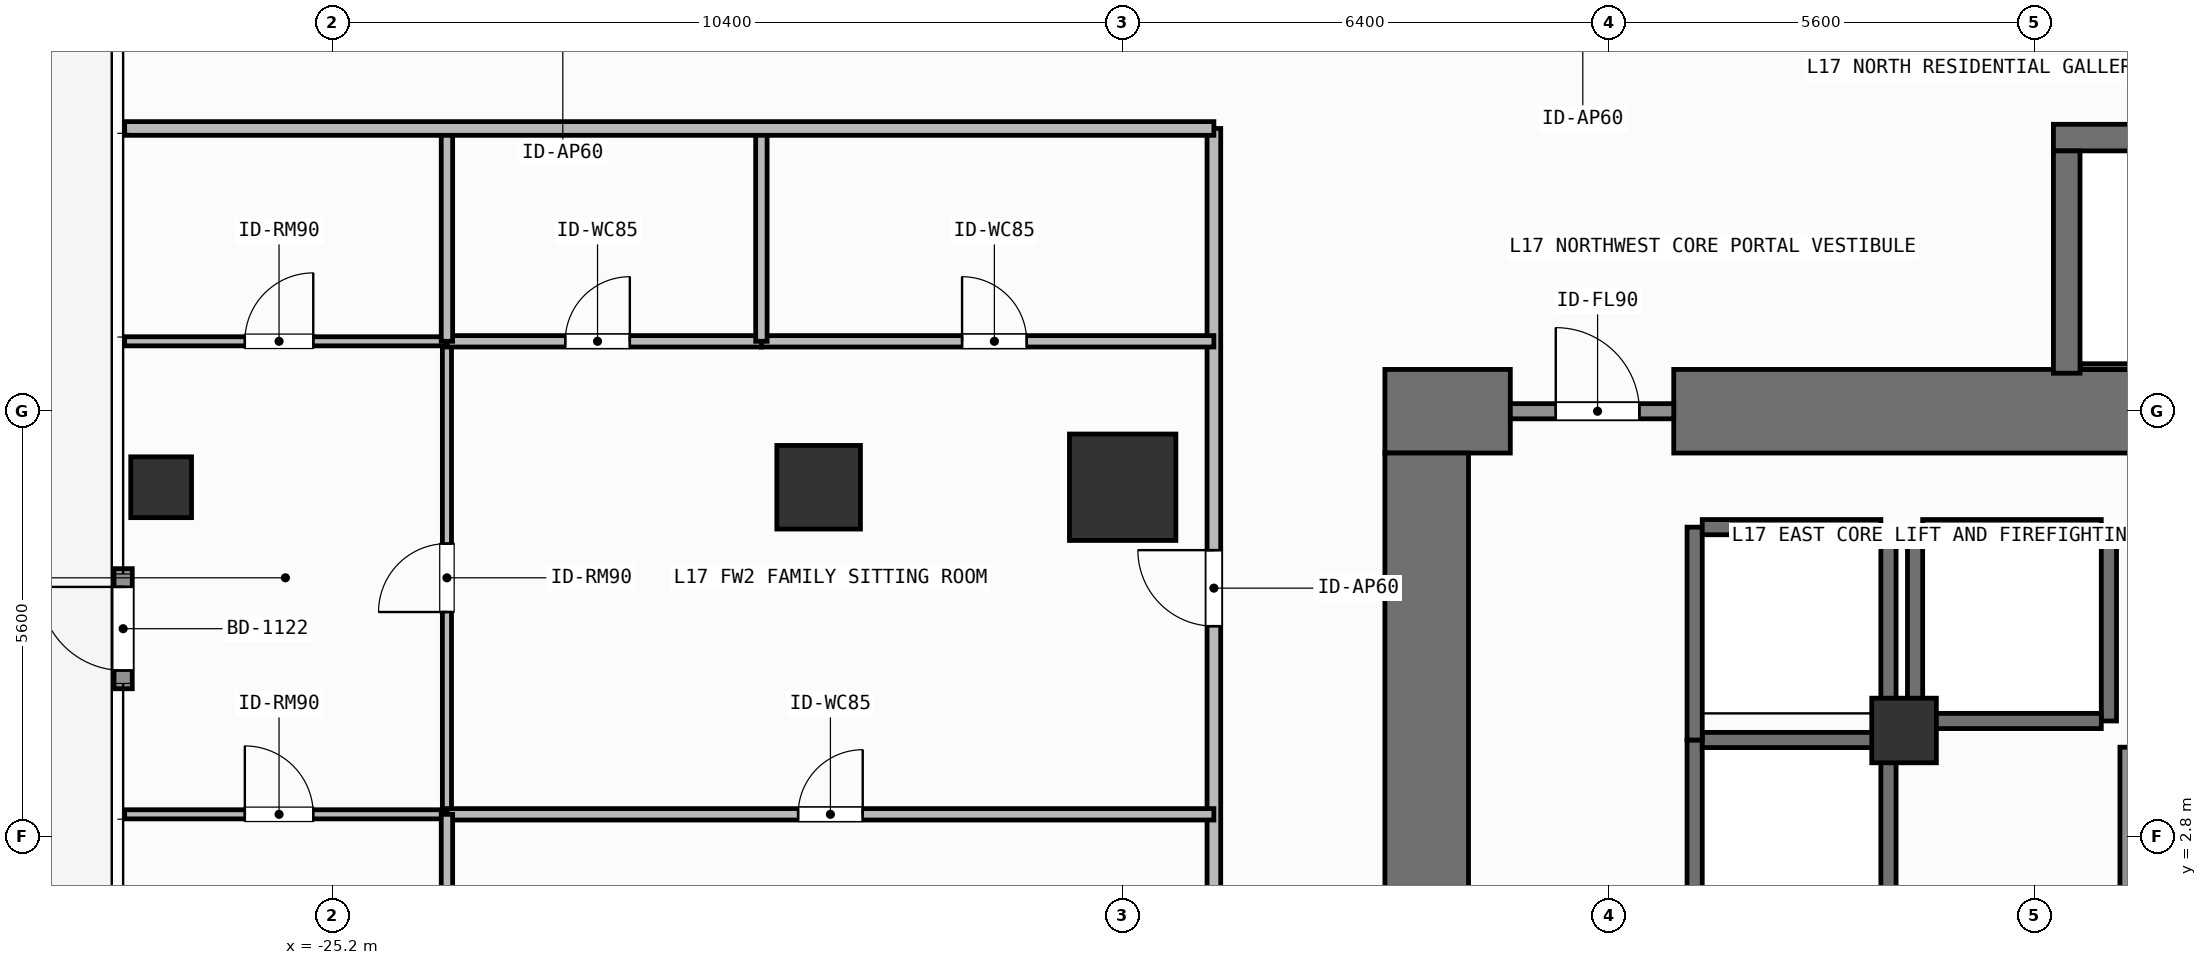
"""IFC4 building model, lengths in metres.
Left out: names, types, materials, properties, quantities, classifications, styles, units other than length and angle.
Written with IfcOpenShell. Run it as: python <this file> out.ifc"""

import sys

from ifc_helpers import new_model, si_unit, direction, frame, frame_2d, origin, origin_2d, place, context, subcontext, project, spatial, rectangle, hollow_rectangle, extrude, element, fill, save


model = new_model("IFC4")
c1 = context("Model", 3, precision=1e-05, world=origin(), true_north=direction((0.0, 1.0)))
c2 = subcontext(c1, "Body", "Model", "MODEL_VIEW")
j1 = project(units=[si_unit("LENGTHUNIT", "METRE"), si_unit("PLANEANGLEUNIT", "RADIAN")], contexts=[c1])
p1 = place(None, origin())
s1 = spatial("IfcSite", under=j1, at=p1, CompositionType="ELEMENT")
p2 = place(p1, origin())
s2 = spatial("IfcBuilding", under=s1, at=p2, CompositionType="ELEMENT")
p3 = place(p2, frame((0.0, 0.0, 65.7)))
s3 = spatial("IfcBuildingStorey", under=s2, at=p3, CompositionType="ELEMENT", Elevation=65.7)
p4 = place(p3, frame((-11.35, 8.4, 0.0), z_axis=(0.0, 0.0, 1.0), x_axis=(1.0, 0.0, 0.0)))
e1 = element("IfcWall", 1, at=p4, inside=s3, PredefinedType="SHEAR", context=c2, shape_type="SweptSolid", body=[
    extrude(rectangle(XDim=1.65, YDim=1.1, at=frame_2d((0.825, 0.0))), origin(), (0.0, 0.0, 1.0), 3.9),
])
p5 = place(p3, frame((-7.55, 8.4, 0.0), z_axis=(0.0, 0.0, 1.0), x_axis=(1.0, 0.0, 0.0)))
e2 = element("IfcWall", 2, at=p5, inside=s3, PredefinedType="SHEAR", context=c2, shape_type="SweptSolid", body=[
    extrude(rectangle(XDim=16.5, YDim=1.1, at=frame_2d((8.25, 0.0))), origin(), (0.0, 0.0, 1.0), 3.9),
])
p6 = place(p3, frame((-10.8, -7.85, 0.0), z_axis=(0.0, 0.0, 1.0), x_axis=(0.0, 1.0, 0.0)))
e3 = element("IfcWall", 3, at=p6, inside=s3, PredefinedType="SHEAR", context=c2, shape_type="SweptSolid", body=[
    extrude(rectangle(XDim=15.7, YDim=1.1, at=frame_2d((7.85, 0.0))), origin(), (0.0, 0.0, 1.0), 3.9),
])
p7 = place(p3, frame((-2.555, 12.0, 0.0), z_axis=(0.0, 0.0, 1.0), x_axis=(1.0, 0.0, 0.0)))
e4 = element("IfcWall", 4, at=p7, inside=s3, PredefinedType="SHEAR", context=c2, shape_type="SweptSolid", body=[
    extrude(rectangle(XDim=7.31, YDim=0.35, at=frame_2d((3.655, 0.0))), origin(), (0.0, 0.0, 1.0), 3.9),
])
p8 = place(p3, frame((-2.2, 8.988, 0.0), z_axis=(0.0, 0.0, 1.0), x_axis=(1.0, 0.0, 0.0)))
e5 = element("IfcWall", 5, at=p8, inside=s3, PredefinedType="SHEAR", context=c2, shape_type="SweptSolid", body=[
    extrude(rectangle(XDim=6.6, YDim=0.075, at=frame_2d((3.3, 0.0))), origin(), (0.0, 0.0, 1.0), 3.9),
])
p9 = place(p3, frame((-2.38, 8.9, 0.0), z_axis=(0.0, 0.0, 1.0), x_axis=(0.0, 1.0, 0.0)))
e6 = element("IfcWall", 6, at=p9, inside=s3, PredefinedType="SHEAR", context=c2, shape_type="SweptSolid", body=[
    extrude(rectangle(XDim=2.925, YDim=0.35, at=frame_2d((1.462, 0.0))), origin(), (0.0, 0.0, 1.0), 3.9),
])
p10 = place(p3, frame((-14.8, 7.4, 0.0), z_axis=(0.0, 0.0, 1.0), x_axis=(1.0, 0.0, 0.0)))
e7 = element("IfcColumn", 7, at=p10, inside=s3, PredefinedType="COLUMN", context=c2, shape_type="SweptSolid", body=[
    extrude(rectangle(XDim=1.4, YDim=1.4, at=origin_2d()), origin(), (0.0, 0.0, 1.0), 3.9),
])
p11 = place(p3, frame((-4.52, 4.2, 0.0), z_axis=(0.0, 0.0, 1.0), x_axis=(1.0, 0.0, 0.0)))
e8 = element("IfcColumn", 8, at=p11, inside=s3, PredefinedType="COLUMN", context=c2, shape_type="SweptSolid", body=[
    extrude(rectangle(XDim=0.85, YDim=0.85, at=origin_2d()), origin(), (0.0, 0.0, 1.0), 3.9),
])
p12 = place(p3, frame((-18.8, 7.4, 0.0), z_axis=(0.0, 0.0, 1.0), x_axis=(1.0, 0.0, 0.0)))
e9 = element("IfcColumn", 9, at=p12, inside=s3, PredefinedType="COLUMN", context=c2, shape_type="SweptSolid", body=[
    extrude(rectangle(XDim=1.1, YDim=1.1, at=origin_2d()), origin(), (0.0, 0.0, 1.0), 3.9),
])
p13 = place(p3, frame((-27.45, 7.4, 0.0), z_axis=(0.0, 0.0, 1.0), x_axis=(1.0, 0.0, 0.0)))
e10 = element("IfcColumn", 10, at=p13, inside=s3, PredefinedType="COLUMN", context=c2, shape_type="SweptSolid", body=[
    extrude(hollow_rectangle(XDim=0.8, YDim=0.8, WallThickness=0.036, at=origin_2d()), origin(), (0.0, 0.0, 1.0), 3.9),
])
p14 = place(p3, frame((-27.95, 4.749, 0.0), z_axis=(0.0, 0.0, 1.0), x_axis=(0.0, 1.0, 0.0)))
e11 = element("IfcWall", 11, at=p14, inside=s3, PredefinedType="SOLIDWALL", context=c2, shape_type="SweptSolid", body=[
    extrude(rectangle(XDim=1.58, YDim=0.24, at=frame_2d((0.79, 0.0))), origin(), (0.0, 0.0, 1.0), 3.68),
])
p15 = place(p14, frame((0.24, 0.0, 0.0)))
e12 = element("IfcOpeningElement", 12, at=p15, cuts=e11, PredefinedType="OPENING", context=c2, shape_type="SweptSolid", body=[
    extrude(rectangle(XDim=1.1, YDim=2.2, at=frame_2d((0.55, 1.1))), frame((0.0, 0.13, 0.0), z_axis=(0.0, -1.0, 0.0), x_axis=(1.0, 0.0, 0.0)), (0.0, 0.0, 1.0), 0.26),
])
for number, where, z_axis, x_axis in (
    (13, (-7.275, 1.275, 0.0), (0.0, 0.0, 1.0), (0.0, 1.0, 0.0)),
    (14, (-4.725, 1.275, 0.0), (0.0, 0.0, 1.0), (0.0, 1.0, 0.0)),
):
    element("IfcWall", number, at=place(p3, frame(where, z_axis=z_axis, x_axis=x_axis)), inside=s3, PredefinedType="SHEAR", context=c2, shape_type="SweptSolid", body=[
        extrude(rectangle(XDim=2.8, YDim=0.2, at=frame_2d((1.4, 0.0))), origin(), (0.0, 0.0, 1.0), 3.68),
    ])
p16 = place(p3, frame((-7.175, 4.075, 0.0), z_axis=(0.0, 0.0, 1.0), x_axis=(1.0, 0.0, 0.0)))
e15 = element("IfcWall", 15, at=p16, inside=s3, PredefinedType="SHEAR", context=c2, shape_type="SweptSolid", body=[
    extrude(rectangle(XDim=2.35, YDim=0.2, at=frame_2d((1.175, 0.0))), origin(), (0.0, 0.0, 1.0), 3.68),
])
for number, where, z_axis, x_axis in (
    (16, (-7.275, 4.075, 0.0), (0.0, 0.0, 1.0), (0.0, 1.0, 0.0)),
    (17, (-4.725, 4.075, 0.0), (0.0, 0.0, 1.0), (0.0, 1.0, 0.0)),
):
    element("IfcWall", number, at=place(p3, frame(where, z_axis=z_axis, x_axis=x_axis)), inside=s3, PredefinedType="SHEAR", context=c2, shape_type="SweptSolid", body=[
        extrude(rectangle(XDim=2.8, YDim=0.2, at=frame_2d((1.4, 0.0))), origin(), (0.0, 0.0, 1.0), 3.68),
    ])
p17 = place(p3, frame((-7.175, 6.875, 0.0), z_axis=(0.0, 0.0, 1.0), x_axis=(1.0, 0.0, 0.0)))
e18 = element("IfcWall", 18, at=p17, inside=s3, PredefinedType="SHEAR", context=c2, shape_type="SweptSolid", body=[
    extrude(rectangle(XDim=2.35, YDim=0.2, at=frame_2d((1.175, 0.0))), origin(), (0.0, 0.0, 1.0), 3.68),
])
for number, where, z_axis, x_axis in (
    (19, (-4.375, 4.325, 0.0), (0.0, 0.0, 1.0), (0.0, 1.0, 0.0)),
    (20, (-1.825, 4.325, 0.0), (0.0, 0.0, 1.0), (0.0, 1.0, 0.0)),
):
    element("IfcWall", number, at=place(p3, frame(where, z_axis=z_axis, x_axis=x_axis)), inside=s3, PredefinedType="SHEAR", context=c2, shape_type="SweptSolid", body=[
        extrude(rectangle(XDim=2.55, YDim=0.2, at=frame_2d((1.275, 0.0))), origin(), (0.0, 0.0, 1.0), 3.68),
    ])
for number, where, z_axis, x_axis in (
    (21, (-4.275, 4.325, 0.0), (0.0, 0.0, 1.0), (1.0, 0.0, 0.0)),
    (22, (-4.275, 6.875, 0.0), (0.0, 0.0, 1.0), (1.0, 0.0, 0.0)),
):
    element("IfcWall", number, at=place(p3, frame(where, z_axis=z_axis, x_axis=x_axis)), inside=s3, PredefinedType="SHEAR", context=c2, shape_type="SweptSolid", body=[
        extrude(rectangle(XDim=2.35, YDim=0.2, at=frame_2d((1.175, 0.0))), origin(), (0.0, 0.0, 1.0), 3.68),
    ])
p18 = place(p3, frame((-9.7, 8.4, 0.0), z_axis=(0.0, 0.0, 1.0), x_axis=(1.0, 0.0, 0.0)))
e23 = element("IfcWall", 23, at=p18, inside=s3, PredefinedType="SOLIDWALL", context=c2, shape_type="SweptSolid", body=[
    extrude(rectangle(XDim=2.15, YDim=0.2, at=frame_2d((1.075, 0.0))), origin(), (0.0, 0.0, 1.0), 2.72),
])
p19 = place(p18, frame((0.598, 0.0, 0.0)))
e24 = element("IfcOpeningElement", 24, at=p19, cuts=e23, PredefinedType="OPENING", context=c2, shape_type="SweptSolid", body=[
    extrude(rectangle(XDim=1.1, YDim=2.15, at=frame_2d((0.55, 1.075))), frame((0.0, 0.11, 0.0), z_axis=(0.0, -1.0, 0.0), x_axis=(1.0, 0.0, 0.0)), (0.0, 0.0, 1.0), 0.22),
])
p20 = place(p3, frame((-13.6, -0.873, 0.0), z_axis=(0.0, 0.0, 1.0), x_axis=(0.0, 1.0, 0.0)))
e25 = element("IfcWall", 25, at=p20, inside=s3, PredefinedType="PARTITIONING", context=c2, shape_type="SweptSolid", body=[
    extrude(rectangle(XDim=12.993, YDim=0.18, at=frame_2d((6.497, 0.0))), origin(), (0.0, 0.0, 1.0), 3.68),
])
p21 = place(p20, frame((6.446, 0.0, 0.0)))
e26 = element("IfcOpeningElement", 26, at=p21, cuts=e25, PredefinedType="OPENING", context=c2, shape_type="SweptSolid", body=[
    extrude(rectangle(XDim=1.0, YDim=2.2, at=frame_2d((0.5, 1.1))), frame((0.0, 0.1, 0.0), z_axis=(0.0, -1.0, 0.0), x_axis=(1.0, 0.0, 0.0)), (0.0, 0.0, 1.0), 0.2),
])
p22 = place(p3, frame((-23.69, 3.097, 0.0), z_axis=(0.0, 0.0, 1.0), x_axis=(0.0, 1.0, 0.0)))
e27 = element("IfcWall", 27, at=p22, inside=s3, PredefinedType="PARTITIONING", context=c2, shape_type="SweptSolid", body=[
    extrude(rectangle(XDim=6.223, YDim=0.12, at=frame_2d((3.112, 0.0))), origin(), (0.0, 0.0, 1.0), 3.68),
])
p23 = place(p22, frame((2.662, 0.0, 0.0)))
e28 = element("IfcOpeningElement", 28, at=p23, cuts=e27, PredefinedType="OPENING", context=c2, shape_type="SweptSolid", body=[
    extrude(rectangle(XDim=0.9, YDim=2.1, at=frame_2d((0.45, 1.05))), frame((0.0, 0.07, 0.0), z_axis=(0.0, -1.0, 0.0), x_axis=(1.0, 0.0, 0.0)), (0.0, 0.0, 1.0), 0.14),
])
p24 = place(p3, frame((-23.69, 9.32, 0.0), z_axis=(0.0, 0.0, 1.0), x_axis=(1.0, 0.0, 0.0)))
e29 = element("IfcWall", 29, at=p24, inside=s3, PredefinedType="PARTITIONING", context=c2, shape_type="SweptSolid", body=[
    extrude(rectangle(XDim=4.137, YDim=0.15, at=frame_2d((2.068, 0.0))), origin(), (0.0, 0.0, 1.0), 3.68),
])
p25 = place(p24, frame((1.556, 0.0, 0.0)))
e30 = element("IfcOpeningElement", 30, at=p25, cuts=e29, PredefinedType="OPENING", context=c2, shape_type="SweptSolid", body=[
    extrude(rectangle(XDim=0.85, YDim=2.1, at=frame_2d((0.425, 1.05))), frame((0.0, 0.085, 0.0), z_axis=(0.0, -1.0, 0.0), x_axis=(1.0, 0.0, 0.0)), (0.0, 0.0, 1.0), 0.17),
])
p26 = place(p3, frame((-19.553, 9.32, 0.0), z_axis=(0.0, 0.0, 1.0), x_axis=(1.0, 0.0, 0.0)))
e31 = element("IfcWall", 31, at=p26, inside=s3, PredefinedType="PARTITIONING", context=c2, shape_type="SweptSolid", body=[
    extrude(rectangle(XDim=5.953, YDim=0.15, at=frame_2d((2.977, 0.0))), origin(), (0.0, 0.0, 1.0), 3.68),
])
p27 = place(p26, frame((2.64, 0.0, 0.0)))
e32 = element("IfcOpeningElement", 32, at=p27, cuts=e31, PredefinedType="OPENING", context=c2, shape_type="SweptSolid", body=[
    extrude(rectangle(XDim=0.85, YDim=2.1, at=frame_2d((0.425, 1.05))), frame((0.0, 0.085, 0.0), z_axis=(0.0, -1.0, 0.0), x_axis=(1.0, 0.0, 0.0)), (0.0, 0.0, 1.0), 0.17),
])
p28 = place(p3, frame((-23.69, 3.097, 0.0), z_axis=(0.0, 0.0, 1.0), x_axis=(1.0, 0.0, 0.0)))
e33 = element("IfcWall", 33, at=p28, inside=s3, PredefinedType="PARTITIONING", context=c2, shape_type="SweptSolid", body=[
    extrude(rectangle(XDim=10.09, YDim=0.15, at=frame_2d((5.045, 0.0))), origin(), (0.0, 0.0, 1.0), 3.68),
])
p29 = place(p28, frame((4.62, 0.0, 0.0)))
e34 = element("IfcOpeningElement", 34, at=p29, cuts=e33, PredefinedType="OPENING", context=c2, shape_type="SweptSolid", body=[
    extrude(rectangle(XDim=0.85, YDim=2.1, at=frame_2d((0.425, 1.05))), frame((0.0, 0.085, 0.0), z_axis=(0.0, -1.0, 0.0), x_axis=(1.0, 0.0, 0.0)), (0.0, 0.0, 1.0), 0.17),
])
p30 = place(p3, frame((-27.93, 3.097, 0.0), z_axis=(0.0, 0.0, 1.0), x_axis=(1.0, 0.0, 0.0)))
e35 = element("IfcWall", 35, at=p30, inside=s3, PredefinedType="PARTITIONING", context=c2, shape_type="SweptSolid", body=[
    extrude(rectangle(XDim=4.24, YDim=0.12, at=frame_2d((2.12, 0.0))), origin(), (0.0, 0.0, 1.0), 3.68),
])
p31 = place(p30, frame((1.581, 0.0, 0.0)))
e36 = element("IfcOpeningElement", 36, at=p31, cuts=e35, PredefinedType="OPENING", context=c2, shape_type="SweptSolid", body=[
    extrude(rectangle(XDim=0.9, YDim=2.1, at=frame_2d((0.45, 1.05))), frame((0.0, 0.07, 0.0), z_axis=(0.0, -1.0, 0.0), x_axis=(1.0, 0.0, 0.0)), (0.0, 0.0, 1.0), 0.14),
])
p32 = place(p3, frame((-27.93, 9.32, 0.0), z_axis=(0.0, 0.0, 1.0), x_axis=(1.0, 0.0, 0.0)))
e37 = element("IfcWall", 37, at=p32, inside=s3, PredefinedType="PARTITIONING", context=c2, shape_type="SweptSolid", body=[
    extrude(rectangle(XDim=4.24, YDim=0.12, at=frame_2d((2.12, 0.0))), origin(), (0.0, 0.0, 1.0), 3.68),
])
p33 = place(p32, frame((1.581, 0.0, 0.0)))
e38 = element("IfcOpeningElement", 38, at=p33, cuts=e37, PredefinedType="OPENING", context=c2, shape_type="SweptSolid", body=[
    extrude(rectangle(XDim=0.9, YDim=2.1, at=frame_2d((0.45, 1.05))), frame((0.0, 0.07, 0.0), z_axis=(0.0, -1.0, 0.0), x_axis=(1.0, 0.0, 0.0)), (0.0, 0.0, 1.0), 0.14),
])
p34 = place(p3, frame((-1.58, -3.98, 0.0), z_axis=(0.0, 0.0, 1.0), x_axis=(0.0, 1.0, 0.0)))
e39 = element("IfcWall", 39, at=p34, inside=s3, PredefinedType="SOLIDWALL", context=c2, shape_type="SweptSolid", body=[
    extrude(rectangle(XDim=7.96, YDim=0.2, at=frame_2d((3.98, 0.0))), origin(), (0.0, 0.0, 1.0), 3.68),
])
p35 = place(p3, frame((-19.553, 9.32, 0.0), z_axis=(0.0, 0.0, 1.0), x_axis=(0.0, 1.0, 0.0)))
e40 = element("IfcWall", 40, at=p35, inside=s3, PredefinedType="PARTITIONING", context=c2, shape_type="SweptSolid", body=[
    extrude(rectangle(XDim=2.8, YDim=0.15, at=frame_2d((1.4, 0.0))), origin(), (0.0, 0.0, 1.0), 3.68),
])
p36 = place(p3, frame((-23.69, -0.873, 0.0), z_axis=(0.0, 0.0, 1.0), x_axis=(0.0, 1.0, 0.0)))
e41 = element("IfcWall", 41, at=p36, inside=s3, PredefinedType="PARTITIONING", context=c2, shape_type="SweptSolid", body=[
    extrude(rectangle(XDim=3.97, YDim=0.15, at=frame_2d((1.985, 0.0))), origin(), (0.0, 0.0, 1.0), 3.68),
])
p37 = place(p3, frame((-23.69, 9.32, 0.0), z_axis=(0.0, 0.0, 1.0), x_axis=(0.0, 1.0, 0.0)))
e42 = element("IfcWall", 42, at=p37, inside=s3, PredefinedType="PARTITIONING", context=c2, shape_type="SweptSolid", body=[
    extrude(rectangle(XDim=2.8, YDim=0.15, at=frame_2d((1.4, 0.0))), origin(), (0.0, 0.0, 1.0), 3.68),
])
p38 = place(p3, frame((-27.93, 12.12, 0.0), z_axis=(0.0, 0.0, 1.0), x_axis=(1.0, 0.0, 0.0)))
e43 = element("IfcWall", 43, at=p38, inside=s3, PredefinedType="PARTITIONING", context=c2, shape_type="SweptSolid", body=[
    extrude(rectangle(XDim=14.33, YDim=0.18, at=frame_2d((7.165, 0.0))), origin(), (0.0, 0.0, 1.0), 3.68),
])
p39 = place(p15, origin())
e44 = element("IfcDoor", 44, at=p39, inside=s3, OperationType="SINGLE_SWING_RIGHT", PredefinedType="DOOR", context=c2, shape_type="SweptSolid", body=[
    extrude(rectangle(XDim=1.1, YDim=2.2, at=frame_2d((0.55, 1.1))), frame((0.0, 0.025, 0.0), z_axis=(0.0, -1.0, 0.0), x_axis=(1.0, 0.0, 0.0)), (0.0, 0.0, 1.0), 0.05),
])
fill(e12, e44)
p40 = place(p19, origin())
e45 = element("IfcDoor", 45, at=p40, inside=s3, OperationType="SINGLE_SWING_LEFT", PredefinedType="DOOR", context=c2, shape_type="SweptSolid", body=[
    extrude(rectangle(XDim=1.1, YDim=2.15, at=frame_2d((0.55, 1.075))), frame((0.0, 0.025, 0.0), z_axis=(0.0, -1.0, 0.0), x_axis=(1.0, 0.0, 0.0)), (0.0, 0.0, 1.0), 0.05),
])
fill(e24, e45)
p41 = place(p21, origin())
e46 = element("IfcDoor", 46, at=p41, inside=s3, OperationType="SINGLE_SWING_RIGHT", PredefinedType="DOOR", context=c2, shape_type="SweptSolid", body=[
    extrude(rectangle(XDim=1.0, YDim=2.2, at=frame_2d((0.5, 1.1))), frame((0.0, 0.025, 0.0), z_axis=(0.0, -1.0, 0.0), x_axis=(1.0, 0.0, 0.0)), (0.0, 0.0, 1.0), 0.05),
])
fill(e26, e46)
p42 = place(p23, origin())
e47 = element("IfcDoor", 47, at=p42, inside=s3, OperationType="SINGLE_SWING_LEFT", PredefinedType="DOOR", context=c2, shape_type="SweptSolid", body=[
    extrude(rectangle(XDim=0.9, YDim=2.1, at=frame_2d((0.45, 1.05))), frame((0.0, 0.025, 0.0), z_axis=(0.0, -1.0, 0.0), x_axis=(1.0, 0.0, 0.0)), (0.0, 0.0, 1.0), 0.05),
])
fill(e28, e47)
p43 = place(p25, origin())
e48 = element("IfcDoor", 48, at=p43, inside=s3, OperationType="SINGLE_SWING_RIGHT", PredefinedType="DOOR", context=c2, shape_type="SweptSolid", body=[
    extrude(rectangle(XDim=0.85, YDim=2.1, at=frame_2d((0.425, 1.05))), frame((0.0, 0.025, 0.0), z_axis=(0.0, -1.0, 0.0), x_axis=(1.0, 0.0, 0.0)), (0.0, 0.0, 1.0), 0.05),
])
fill(e30, e48)
p44 = place(p27, origin())
e49 = element("IfcDoor", 49, at=p44, inside=s3, OperationType="SINGLE_SWING_LEFT", PredefinedType="DOOR", context=c2, shape_type="SweptSolid", body=[
    extrude(rectangle(XDim=0.85, YDim=2.1, at=frame_2d((0.425, 1.05))), frame((0.0, 0.025, 0.0), z_axis=(0.0, -1.0, 0.0), x_axis=(1.0, 0.0, 0.0)), (0.0, 0.0, 1.0), 0.05),
])
fill(e32, e49)
p45 = place(p29, origin())
e50 = element("IfcDoor", 50, at=p45, inside=s3, OperationType="SINGLE_SWING_RIGHT", PredefinedType="DOOR", context=c2, shape_type="SweptSolid", body=[
    extrude(rectangle(XDim=0.85, YDim=2.1, at=frame_2d((0.425, 1.05))), frame((0.0, 0.025, 0.0), z_axis=(0.0, -1.0, 0.0), x_axis=(1.0, 0.0, 0.0)), (0.0, 0.0, 1.0), 0.05),
])
fill(e34, e50)
p46 = place(p31, origin())
e51 = element("IfcDoor", 51, at=p46, inside=s3, OperationType="SINGLE_SWING_LEFT", PredefinedType="DOOR", context=c2, shape_type="SweptSolid", body=[
    extrude(rectangle(XDim=0.9, YDim=2.1, at=frame_2d((0.45, 1.05))), frame((0.0, 0.025, 0.0), z_axis=(0.0, -1.0, 0.0), x_axis=(1.0, 0.0, 0.0)), (0.0, 0.0, 1.0), 0.05),
])
fill(e36, e51)
p47 = place(p33, origin())
e52 = element("IfcDoor", 52, at=p47, inside=s3, OperationType="SINGLE_SWING_RIGHT", PredefinedType="DOOR", context=c2, shape_type="SweptSolid", body=[
    extrude(rectangle(XDim=0.9, YDim=2.1, at=frame_2d((0.45, 1.05))), frame((0.0, 0.025, 0.0), z_axis=(0.0, -1.0, 0.0), x_axis=(1.0, 0.0, 0.0)), (0.0, 0.0, 1.0), 0.05),
])
fill(e38, e52)
save(model, sys.argv[1])
